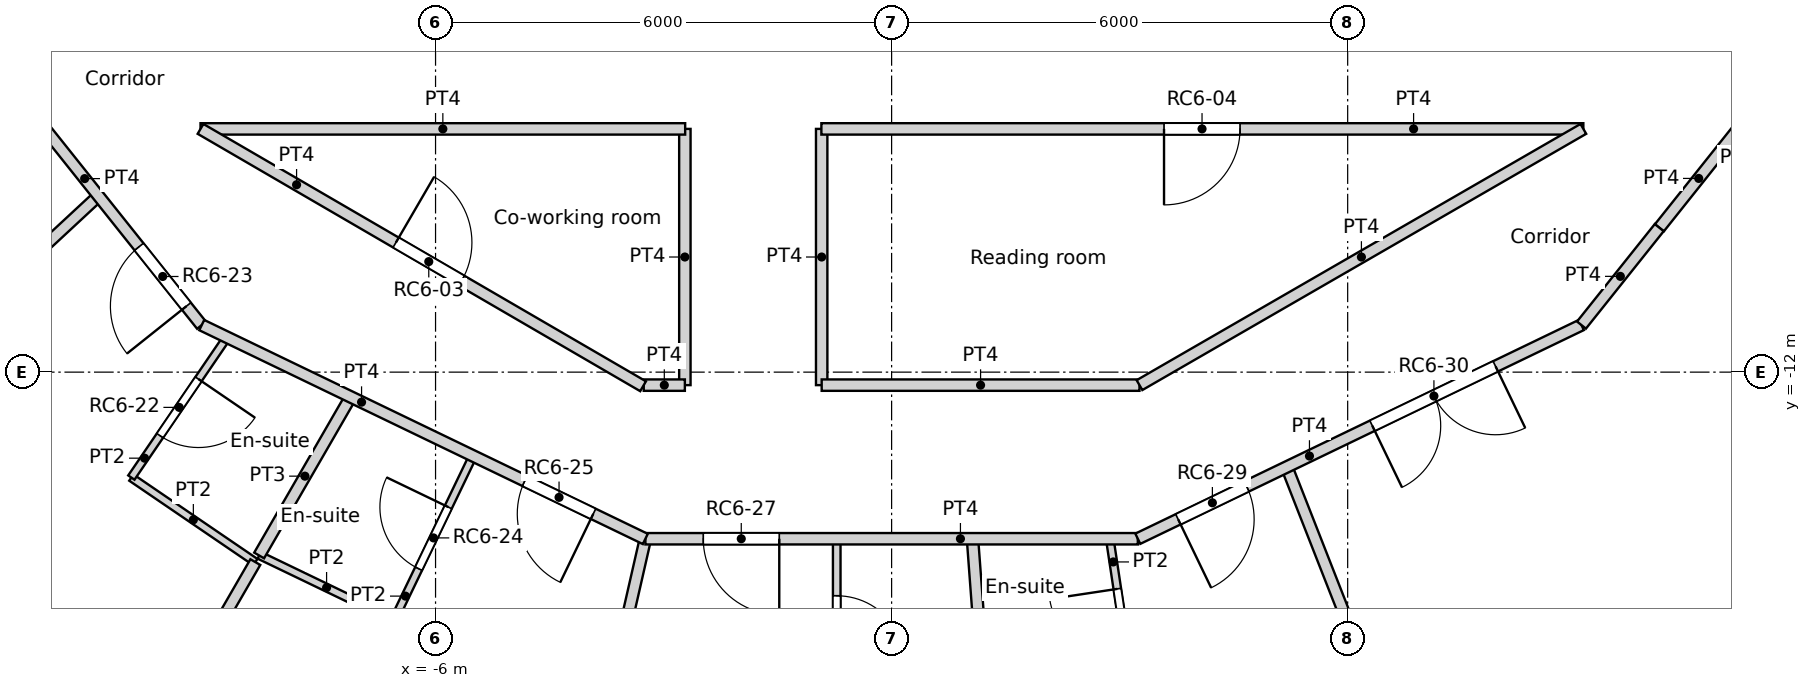
"""IFC4 building model, lengths in metres.
Left out: names, types, materials, properties, quantities, classifications, styles, units other than length and angle.
Written with IfcOpenShell. Run it as: python <this file> out.ifc"""

import sys

from ifc_helpers import new_model, si_unit, direction, frame, frame_2d, origin, place, context, subcontext, project, spatial, rectangle, extrude, element, fill, save


model = new_model("IFC4")
c1 = context("Model", 3, precision=1e-05, world=origin(), true_north=direction((0.0, 1.0)))
c2 = subcontext(c1, "Body", "Model", "MODEL_VIEW")
j1 = project(units=[si_unit("LENGTHUNIT", "METRE"), si_unit("PLANEANGLEUNIT", "RADIAN")], contexts=[c1])
p1 = place(None, origin())
s1 = spatial("IfcSite", under=j1, at=p1, CompositionType="ELEMENT")
p2 = place(p1, origin())
s2 = spatial("IfcBuilding", under=s1, at=p2, CompositionType="ELEMENT")
p3 = place(p2, frame((0.0, 0.0, 283.8)))
s3 = spatial("IfcBuildingStorey", under=s2, at=p3, CompositionType="ELEMENT", Elevation=283.8)
p4 = place(p3, frame((-9.092, -8.8, 0.0), z_axis=(0.0, 0.0, 1.0), x_axis=(1.0, 0.0, 0.0)))
e1 = element("IfcWall", 1, at=p4, inside=s3, PredefinedType="PARTITIONING", context=c2, shape_type="SweptSolid", body=[
    extrude(rectangle(XDim=6.376, YDim=0.15, at=frame_2d((3.188, 0.0))), origin(), (0.0, 0.0, 1.0), 3.25),
])
p5 = place(p3, frame((-9.092, -8.8, 0.0), z_axis=(0.0, 0.0, 1.0), x_axis=(0.864470922103, -0.502682827277, 0.0)))
e2 = element("IfcWall", 2, at=p5, inside=s3, PredefinedType="PARTITIONING", context=c2, shape_type="SweptSolid", body=[
    extrude(rectangle(XDim=6.735, YDim=0.15, at=frame_2d((3.368, 0.0))), origin(), (0.0, 0.0, 1.0), 3.25),
])
p6 = place(p5, frame((2.974, 0.0, 0.0)))
e3 = element("IfcOpeningElement", 3, at=p6, cuts=e2, PredefinedType="OPENING", context=c2, shape_type="SweptSolid", body=[
    extrude(rectangle(XDim=1.0, YDim=2.04, at=frame_2d((0.5, 1.02))), frame((0.0, 0.075, 0.0), z_axis=(0.0, -1.0, 0.0), x_axis=(1.0, 0.0, 0.0)), (0.0, 0.0, 1.0), 0.15),
])
p7 = place(p3, frame((-0.924, -8.8, 0.0), z_axis=(0.0, 0.0, 1.0), x_axis=(1.0, 0.0, 0.0)))
e4 = element("IfcWall", 4, at=p7, inside=s3, PredefinedType="PARTITIONING", context=c2, shape_type="SweptSolid", body=[
    extrude(rectangle(XDim=10.025, YDim=0.15, at=frame_2d((5.012, 0.0))), origin(), (0.0, 0.0, 1.0), 3.25),
])
p8 = place(p7, frame((4.508, 0.0, 0.0)))
e5 = element("IfcOpeningElement", 5, at=p8, cuts=e4, PredefinedType="OPENING", context=c2, shape_type="SweptSolid", body=[
    extrude(rectangle(XDim=1.0, YDim=2.04, at=frame_2d((0.5, 1.02))), frame((0.0, 0.075, 0.0), z_axis=(0.0, -1.0, 0.0), x_axis=(1.0, 0.0, 0.0)), (0.0, 0.0, 1.0), 0.15),
])
p9 = place(p3, frame((-11.3, -8.596, 0.0), z_axis=(0.0, 0.0, 1.0), x_axis=(0.623390921228, -0.781910326911, 0.0)))
e6 = element("IfcWall", 6, at=p9, inside=s3, PredefinedType="PARTITIONING", context=c2, shape_type="SweptSolid", body=[
    extrude(rectangle(XDim=3.564, YDim=0.15, at=frame_2d((1.782, 0.0))), origin(), (0.0, 0.0, 1.0), 3.25),
])
p10 = place(p9, frame((2.244, 0.0, 0.0)))
e7 = element("IfcOpeningElement", 7, at=p10, cuts=e6, PredefinedType="OPENING", context=c2, shape_type="SweptSolid", body=[
    extrude(rectangle(XDim=1.0, YDim=2.1, at=frame_2d((0.5, 1.05))), frame((0.0, 0.075, 0.0), z_axis=(0.0, -1.0, 0.0), x_axis=(1.0, 0.0, 0.0)), (0.0, 0.0, 1.0), 0.15),
])
p11 = place(p3, frame((10.101, -10.101, 0.0), z_axis=(0.0, 0.0, 1.0), x_axis=(0.623098344652, 0.782143498913, 0.0)))
e8 = element("IfcWall", 8, at=p11, inside=s3, PredefinedType="PARTITIONING", context=c2, shape_type="SweptSolid", body=[
    extrude(rectangle(XDim=1.661, YDim=0.15, at=frame_2d((0.831, 0.0))), origin(), (0.0, 0.0, 1.0), 3.25),
])
p12 = place(p3, frame((-3.261, -12.171, 0.0), z_axis=(0.0, 0.0, 1.0), x_axis=(1.0, 0.0, 0.0)))
e9 = element("IfcWall", 9, at=p12, inside=s3, PredefinedType="PARTITIONING", context=c2, shape_type="SweptSolid", body=[
    extrude(rectangle(XDim=0.541, YDim=0.15, at=frame_2d((0.271, 0.0))), origin(), (0.0, 0.0, 1.0), 3.25),
])
for number, where, z_axis, x_axis in (
    (10, (-2.72, -12.171, 0.0), (0.0, 0.0, 1.0), (0.0, 1.0, 0.0)),
    (11, (-0.92, -12.171, 0.0), (0.0, 0.0, 1.0), (0.0, 1.0, 0.0)),
):
    element("IfcWall", number, at=place(p3, frame(where, z_axis=z_axis, x_axis=x_axis)), inside=s3, PredefinedType="PARTITIONING", context=c2, shape_type="SweptSolid", body=[
        extrude(rectangle(XDim=3.371, YDim=0.15, at=frame_2d((1.686, 0.0))), origin(), (0.0, 0.0, 1.0), 3.25),
    ])
p13 = place(p3, frame((-0.92, -12.171, 0.0), z_axis=(0.0, 0.0, 1.0), x_axis=(1.0, 0.0, 0.0)))
e12 = element("IfcWall", 12, at=p13, inside=s3, PredefinedType="PARTITIONING", context=c2, shape_type="SweptSolid", body=[
    extrude(rectangle(XDim=4.181, YDim=0.15, at=frame_2d((2.09, 0.0))), origin(), (0.0, 0.0, 1.0), 3.25),
])
p14 = place(p3, frame((3.261, -12.171, 0.0), z_axis=(0.0, 0.0, 1.0), x_axis=(0.866066809554, 0.499928276245, 0.0)))
e13 = element("IfcWall", 13, at=p14, inside=s3, PredefinedType="PARTITIONING", context=c2, shape_type="SweptSolid", body=[
    extrude(rectangle(XDim=6.743, YDim=0.15, at=frame_2d((3.371, 0.0))), origin(), (0.0, 0.0, 1.0), 3.25),
])
p15 = place(p3, frame((-9.076, -11.381, 0.0), z_axis=(0.0, 0.0, 1.0), x_axis=(0.900778421649, -0.434278983018, 0.0)))
e14 = element("IfcWall", 14, at=p15, inside=s3, PredefinedType="PARTITIONING", context=c2, shape_type="SweptSolid", body=[
    extrude(rectangle(XDim=6.479, YDim=0.15, at=frame_2d((3.239, 0.0))), origin(), (0.0, 0.0, 1.0), 3.25),
])
p16 = place(p15, frame((4.719, 0.0, 0.0)))
e15 = element("IfcOpeningElement", 15, at=p16, cuts=e14, PredefinedType="OPENING", context=c2, shape_type="SweptSolid", body=[
    extrude(rectangle(XDim=1.0, YDim=2.1, at=frame_2d((0.5, 1.05))), frame((0.0, 0.075, 0.0), z_axis=(0.0, -1.0, 0.0), x_axis=(1.0, 0.0, 0.0)), (0.0, 0.0, 1.0), 0.15),
])
p17 = place(p3, frame((-3.239, -14.192, 0.0), z_axis=(0.0, 0.0, 1.0), x_axis=(1.0, 0.0, 0.0)))
e16 = element("IfcWall", 16, at=p17, inside=s3, PredefinedType="PARTITIONING", context=c2, shape_type="SweptSolid", body=[
    extrude(rectangle(XDim=6.478, YDim=0.15, at=frame_2d((3.239, 0.0))), origin(), (0.0, 0.0, 1.0), 3.25),
])
p18 = place(p17, frame((0.761, 0.0, 0.0)))
e17 = element("IfcOpeningElement", 17, at=p18, cuts=e16, PredefinedType="OPENING", context=c2, shape_type="SweptSolid", body=[
    extrude(rectangle(XDim=1.0, YDim=2.1, at=frame_2d((0.5, 1.05))), frame((0.0, 0.075, 0.0), z_axis=(0.0, -1.0, 0.0), x_axis=(1.0, 0.0, 0.0)), (0.0, 0.0, 1.0), 0.15),
])
p19 = place(p3, frame((3.239, -14.192, 0.0), z_axis=(0.0, 0.0, 1.0), x_axis=(0.900851590682, 0.434127183629, 0.0)))
e18 = element("IfcWall", 18, at=p19, inside=s3, PredefinedType="PARTITIONING", context=c2, shape_type="SweptSolid", body=[
    extrude(rectangle(XDim=6.479, YDim=0.15, at=frame_2d((3.239, 0.0))), origin(), (0.0, 0.0, 1.0), 3.25),
])
p20 = place(p19, frame((0.589, 0.0, 0.0)))
e19 = element("IfcOpeningElement", 19, at=p20, cuts=e18, PredefinedType="OPENING", context=c2, shape_type="SweptSolid", body=[
    extrude(rectangle(XDim=1.0, YDim=2.1, at=frame_2d((0.5, 1.05))), frame((0.0, 0.075, 0.0), z_axis=(0.0, -1.0, 0.0), x_axis=(1.0, 0.0, 0.0)), (0.0, 0.0, 1.0), 0.15),
])
p21 = place(p19, frame((3.425, 0.0, 0.0)))
e20 = element("IfcOpeningElement", 20, at=p21, cuts=e18, PredefinedType="OPENING", context=c2, shape_type="SweptSolid", body=[
    extrude(rectangle(XDim=1.8, YDim=2.1, at=frame_2d((0.9, 1.05))), frame((0.0, 0.075, 0.0), z_axis=(0.0, -1.0, 0.0), x_axis=(1.0, 0.0, 0.0)), (0.0, 0.0, 1.0), 0.15),
])
p22 = place(p3, frame((9.076, -11.381, 0.0), z_axis=(0.0, 0.0, 1.0), x_axis=(0.623805208652, 0.781579849829, 0.0)))
e21 = element("IfcWall", 21, at=p22, inside=s3, PredefinedType="PARTITIONING", context=c2, shape_type="SweptSolid", body=[
    extrude(rectangle(XDim=1.64, YDim=0.15, at=frame_2d((0.82, 0.0))), origin(), (0.0, 0.0, 1.0), 3.25),
])
p23 = place(p3, frame((-14.493, -13.448, 0.0), z_axis=(0.0, 0.0, 1.0), x_axis=(0.73295202722, 0.68028032883, 0.0)))
e22 = element("IfcWall", 22, at=p23, inside=s3, PredefinedType="PARTITIONING", context=c2, shape_type="SweptSolid", body=[
    extrude(rectangle(XDim=5.539, YDim=0.15, at=frame_2d((2.77, 0.0))), origin(), (0.0, 0.0, 1.0), 3.25),
])
p24 = place(p3, frame((-10.002, -13.387, 0.0), z_axis=(0.0, 0.0, 1.0), x_axis=(0.563469042551, 0.826137178734, 0.0)))
e23 = element("IfcWall", 23, at=p24, inside=s3, PredefinedType="PARTITIONING", context=c2, shape_type="SweptSolid", body=[
    extrude(rectangle(XDim=2.234, YDim=0.1, at=frame_2d((1.117, 0.0))), origin(), (0.0, 0.0, 1.0), 3.25),
])
p25 = place(p24, frame((0.667, 0.0, 0.0)))
e24 = element("IfcOpeningElement", 24, at=p25, cuts=e23, PredefinedType="OPENING", context=c2, shape_type="SweptSolid", body=[
    extrude(rectangle(XDim=0.9, YDim=2.04, at=frame_2d((0.45, 1.02))), frame((0.0, 0.05, 0.0), z_axis=(0.0, -1.0, 0.0), x_axis=(1.0, 0.0, 0.0)), (0.0, 0.0, 1.0), 0.1),
])
p26 = place(p3, frame((-10.002, -13.387, 0.0), z_axis=(0.0, 0.0, 1.0), x_axis=(0.82620117489, -0.563375202339, 0.0)))
e25 = element("IfcWall", 25, at=p26, inside=s3, PredefinedType="PARTITIONING", context=c2, shape_type="SweptSolid", body=[
    extrude(rectangle(XDim=1.974, YDim=0.1, at=frame_2d((0.987, 0.0))), origin(), (0.0, 0.0, 1.0), 3.25),
])
p27 = place(p3, frame((-9.886, -17.122, 0.0), z_axis=(0.0, 0.0, 1.0), x_axis=(0.500117793536, 0.865957384972, 0.0)))
e26 = element("IfcWall", 26, at=p27, inside=s3, PredefinedType="PARTITIONING", context=c2, shape_type="SweptSolid", body=[
    extrude(rectangle(XDim=3.029, YDim=0.15, at=frame_2d((1.515, 0.0))), origin(), (0.0, 0.0, 1.0), 3.25),
])
p28 = place(p3, frame((-8.321, -14.412, 0.0), z_axis=(0.0, 0.0, 1.0), x_axis=(0.500017667814, 0.866015203027, 0.0)))
e27 = element("IfcWall", 27, at=p28, inside=s3, PredefinedType="PARTITIONING", context=c2, shape_type="SweptSolid", body=[
    extrude(rectangle(XDim=2.41, YDim=0.15, at=frame_2d((1.205, 0.0))), origin(), (0.0, 0.0, 1.0), 3.25),
])
p29 = place(p3, frame((-8.319, -14.409, 0.0), z_axis=(0.0, 0.0, 1.0), x_axis=(0.900936932599, -0.433950047216, 0.0)))
e28 = element("IfcWall", 28, at=p29, inside=s3, PredefinedType="PARTITIONING", context=c2, shape_type="SweptSolid", body=[
    extrude(rectangle(XDim=1.966, YDim=0.1, at=frame_2d((0.983, 0.0))), origin(), (0.0, 0.0, 1.0), 3.25),
])
p30 = place(p3, frame((-6.548, -15.262, 0.0), z_axis=(0.0, 0.0, 1.0), x_axis=(0.433855388624, 0.900982520231, 0.0)))
e29 = element("IfcWall", 29, at=p30, inside=s3, PredefinedType="PARTITIONING", context=c2, shape_type="SweptSolid", body=[
    extrude(rectangle(XDim=2.399, YDim=0.1, at=frame_2d((1.2, 0.0))), origin(), (0.0, 0.0, 1.0), 3.25),
])
p31 = place(p30, frame((0.75, 0.0, 0.0)))
e30 = element("IfcOpeningElement", 30, at=p31, cuts=e29, PredefinedType="OPENING", context=c2, shape_type="SweptSolid", body=[
    extrude(rectangle(XDim=0.9, YDim=2.04, at=frame_2d((0.45, 1.02))), frame((0.0, 0.05, 0.0), z_axis=(0.0, -1.0, 0.0), x_axis=(1.0, 0.0, 0.0)), (0.0, 0.0, 1.0), 0.1),
])
p32 = place(p3, frame((-4.4, -19.276, 0.0), z_axis=(0.0, 0.0, 1.0), x_axis=(0.222612505682, 0.974907007008, 0.0)))
e31 = element("IfcWall", 31, at=p32, inside=s3, PredefinedType="PARTITIONING", context=c2, shape_type="SweptSolid", body=[
    extrude(rectangle(XDim=5.215, YDim=0.15, at=frame_2d((2.607, 0.0))), origin(), (0.0, 0.0, 1.0), 3.25),
])
p33 = place(p3, frame((-0.722, -16.592, 0.0), z_axis=(0.0, 0.0, 1.0), x_axis=(0.0, 1.0, 0.0)))
e32 = element("IfcWall", 32, at=p33, inside=s3, PredefinedType="PARTITIONING", context=c2, shape_type="SweptSolid", body=[
    extrude(rectangle(XDim=2.4, YDim=0.1, at=frame_2d((1.2, 0.0))), origin(), (0.0, 0.0, 1.0), 3.25),
])
p34 = place(p33, frame((0.75, 0.0, 0.0)))
e33 = element("IfcOpeningElement", 33, at=p34, cuts=e32, PredefinedType="OPENING", context=c2, shape_type="SweptSolid", body=[
    extrude(rectangle(XDim=0.9, YDim=2.04, at=frame_2d((0.45, 1.02))), frame((0.0, 0.05, 0.0), z_axis=(0.0, -1.0, 0.0), x_axis=(1.0, 0.0, 0.0)), (0.0, 0.0, 1.0), 0.1),
])
p35 = place(p3, frame((1.064, -14.192, 0.0), z_axis=(0.0, 0.0, 1.0), x_axis=(0.074353677934, -0.997231934195, 0.0)))
e34 = element("IfcWall", 34, at=p35, inside=s3, PredefinedType="PARTITIONING", context=c2, shape_type="SweptSolid", body=[
    extrude(rectangle(XDim=2.407, YDim=0.15, at=frame_2d((1.203, 0.0))), origin(), (0.0, 0.0, 1.0), 3.25),
])
p36 = place(p3, frame((2.87, -14.192, 0.0), z_axis=(0.0, 0.0, 1.0), x_axis=(0.148960349288, -0.988843169739, 0.0)))
e35 = element("IfcWall", 35, at=p36, inside=s3, PredefinedType="PARTITIONING", context=c2, shape_type="SweptSolid", body=[
    extrude(rectangle(XDim=2.234, YDim=0.1, at=frame_2d((1.117, 0.0))), origin(), (0.0, 0.0, 1.0), 3.25),
])
p37 = place(p36, frame((0.667, 0.0, 0.0)))
e36 = element("IfcOpeningElement", 36, at=p37, cuts=e35, PredefinedType="OPENING", context=c2, shape_type="SweptSolid", body=[
    extrude(rectangle(XDim=0.9, YDim=2.04, at=frame_2d((0.45, 1.02))), frame((0.0, 0.05, 0.0), z_axis=(0.0, -1.0, 0.0), x_axis=(1.0, 0.0, 0.0)), (0.0, 0.0, 1.0), 0.1),
])
p38 = place(p3, frame((5.199, -13.248, 0.0), z_axis=(0.0, 0.0, 1.0), x_axis=(0.365334662456, -0.930876245485, 0.0)))
e37 = element("IfcWall", 37, at=p38, inside=s3, PredefinedType="PARTITIONING", context=c2, shape_type="SweptSolid", body=[
    extrude(rectangle(XDim=5.54, YDim=0.15, at=frame_2d((2.77, 0.0))), origin(), (0.0, 0.0, 1.0), 3.25),
])
p39 = place(p6, origin())
e38 = element("IfcDoor", 38, at=p39, inside=s3, OperationType="SINGLE_SWING_LEFT", PredefinedType="DOOR", context=c2, shape_type="SweptSolid", body=[
    extrude(rectangle(XDim=1.0, YDim=2.04, at=frame_2d((0.5, 1.02))), frame((0.0, 0.025, 0.0), z_axis=(0.0, -1.0, 0.0), x_axis=(1.0, 0.0, 0.0)), (0.0, 0.0, 1.0), 0.05),
])
fill(e3, e38)
p40 = place(p8, origin())
e39 = element("IfcDoor", 39, at=p40, inside=s3, OperationType="SINGLE_SWING_RIGHT", PredefinedType="DOOR", context=c2, shape_type="SweptSolid", body=[
    extrude(rectangle(XDim=1.0, YDim=2.04, at=frame_2d((0.5, 1.02))), frame((0.0, 0.025, 0.0), z_axis=(0.0, -1.0, 0.0), x_axis=(1.0, 0.0, 0.0)), (0.0, 0.0, 1.0), 0.05),
])
fill(e5, e39)
p41 = place(p25, origin())
e40 = element("IfcDoor", 40, at=p41, inside=s3, OperationType="SINGLE_SWING_LEFT", PredefinedType="DOOR", context=c2, shape_type="SweptSolid", body=[
    extrude(rectangle(XDim=0.9, YDim=2.04, at=frame_2d((0.45, 1.02))), frame((0.0, 0.025, 0.0), z_axis=(0.0, -1.0, 0.0), x_axis=(1.0, 0.0, 0.0)), (0.0, 0.0, 1.0), 0.05),
])
fill(e24, e40)
p42 = place(p10, origin())
e41 = element("IfcDoor", 41, at=p42, inside=s3, OperationType="SINGLE_SWING_LEFT", PredefinedType="DOOR", context=c2, shape_type="SweptSolid", body=[
    extrude(rectangle(XDim=1.0, YDim=2.1, at=frame_2d((0.5, 1.05))), frame((0.0, 0.025, 0.0), z_axis=(0.0, -1.0, 0.0), x_axis=(1.0, 0.0, 0.0)), (0.0, 0.0, 1.0), 0.05),
])
fill(e7, e41)
p43 = place(p31, origin())
e42 = element("IfcDoor", 42, at=p43, inside=s3, OperationType="SINGLE_SWING_RIGHT", PredefinedType="DOOR", context=c2, shape_type="SweptSolid", body=[
    extrude(rectangle(XDim=0.9, YDim=2.04, at=frame_2d((0.45, 1.02))), frame((0.0, 0.025, 0.0), z_axis=(0.0, -1.0, 0.0), x_axis=(1.0, 0.0, 0.0)), (0.0, 0.0, 1.0), 0.05),
])
fill(e30, e42)
p44 = place(p16, origin())
e43 = element("IfcDoor", 43, at=p44, inside=s3, OperationType="SINGLE_SWING_LEFT", PredefinedType="DOOR", context=c2, shape_type="SweptSolid", body=[
    extrude(rectangle(XDim=1.0, YDim=2.1, at=frame_2d((0.5, 1.05))), frame((0.0, 0.025, 0.0), z_axis=(0.0, -1.0, 0.0), x_axis=(1.0, 0.0, 0.0)), (0.0, 0.0, 1.0), 0.05),
])
fill(e15, e43)
p45 = place(p34, origin())
e44 = element("IfcDoor", 44, at=p45, inside=s3, OperationType="SINGLE_SWING_RIGHT", PredefinedType="DOOR", context=c2, shape_type="SweptSolid", body=[
    extrude(rectangle(XDim=0.9, YDim=2.04, at=frame_2d((0.45, 1.02))), frame((0.0, 0.025, 0.0), z_axis=(0.0, -1.0, 0.0), x_axis=(1.0, 0.0, 0.0)), (0.0, 0.0, 1.0), 0.05),
])
fill(e33, e44)
p46 = place(p18, origin())
e45 = element("IfcDoor", 45, at=p46, inside=s3, OperationType="SINGLE_SWING_LEFT", PredefinedType="DOOR", context=c2, shape_type="SweptSolid", body=[
    extrude(rectangle(XDim=1.0, YDim=2.1, at=frame_2d((0.5, 1.05))), frame((0.0, 0.025, 0.0), z_axis=(0.0, -1.0, 0.0), x_axis=(1.0, 0.0, 0.0)), (0.0, 0.0, 1.0), 0.05),
])
fill(e17, e45)
p47 = place(p37, origin())
e46 = element("IfcDoor", 46, at=p47, inside=s3, OperationType="SINGLE_SWING_RIGHT", PredefinedType="DOOR", context=c2, shape_type="SweptSolid", body=[
    extrude(rectangle(XDim=0.9, YDim=2.04, at=frame_2d((0.45, 1.02))), frame((0.0, 0.025, 0.0), z_axis=(0.0, -1.0, 0.0), x_axis=(1.0, 0.0, 0.0)), (0.0, 0.0, 1.0), 0.05),
])
fill(e36, e46)
p48 = place(p20, origin())
e47 = element("IfcDoor", 47, at=p48, inside=s3, OperationType="SINGLE_SWING_RIGHT", PredefinedType="DOOR", context=c2, shape_type="SweptSolid", body=[
    extrude(rectangle(XDim=1.0, YDim=2.1, at=frame_2d((0.5, 1.05))), frame((0.0, 0.025, 0.0), z_axis=(0.0, -1.0, 0.0), x_axis=(1.0, 0.0, 0.0)), (0.0, 0.0, 1.0), 0.05),
])
fill(e19, e47)
p49 = place(p21, origin())
e48 = element("IfcDoor", 48, at=p49, inside=s3, OperationType="DOUBLE_DOOR_SINGLE_SWING", PredefinedType="DOOR", context=c2, shape_type="SweptSolid", body=[
    extrude(rectangle(XDim=1.8, YDim=2.1, at=frame_2d((0.9, 1.05))), frame((0.0, 0.025, 0.0), z_axis=(0.0, -1.0, 0.0), x_axis=(1.0, 0.0, 0.0)), (0.0, 0.0, 1.0), 0.05),
])
fill(e20, e48)
save(model, sys.argv[1])
